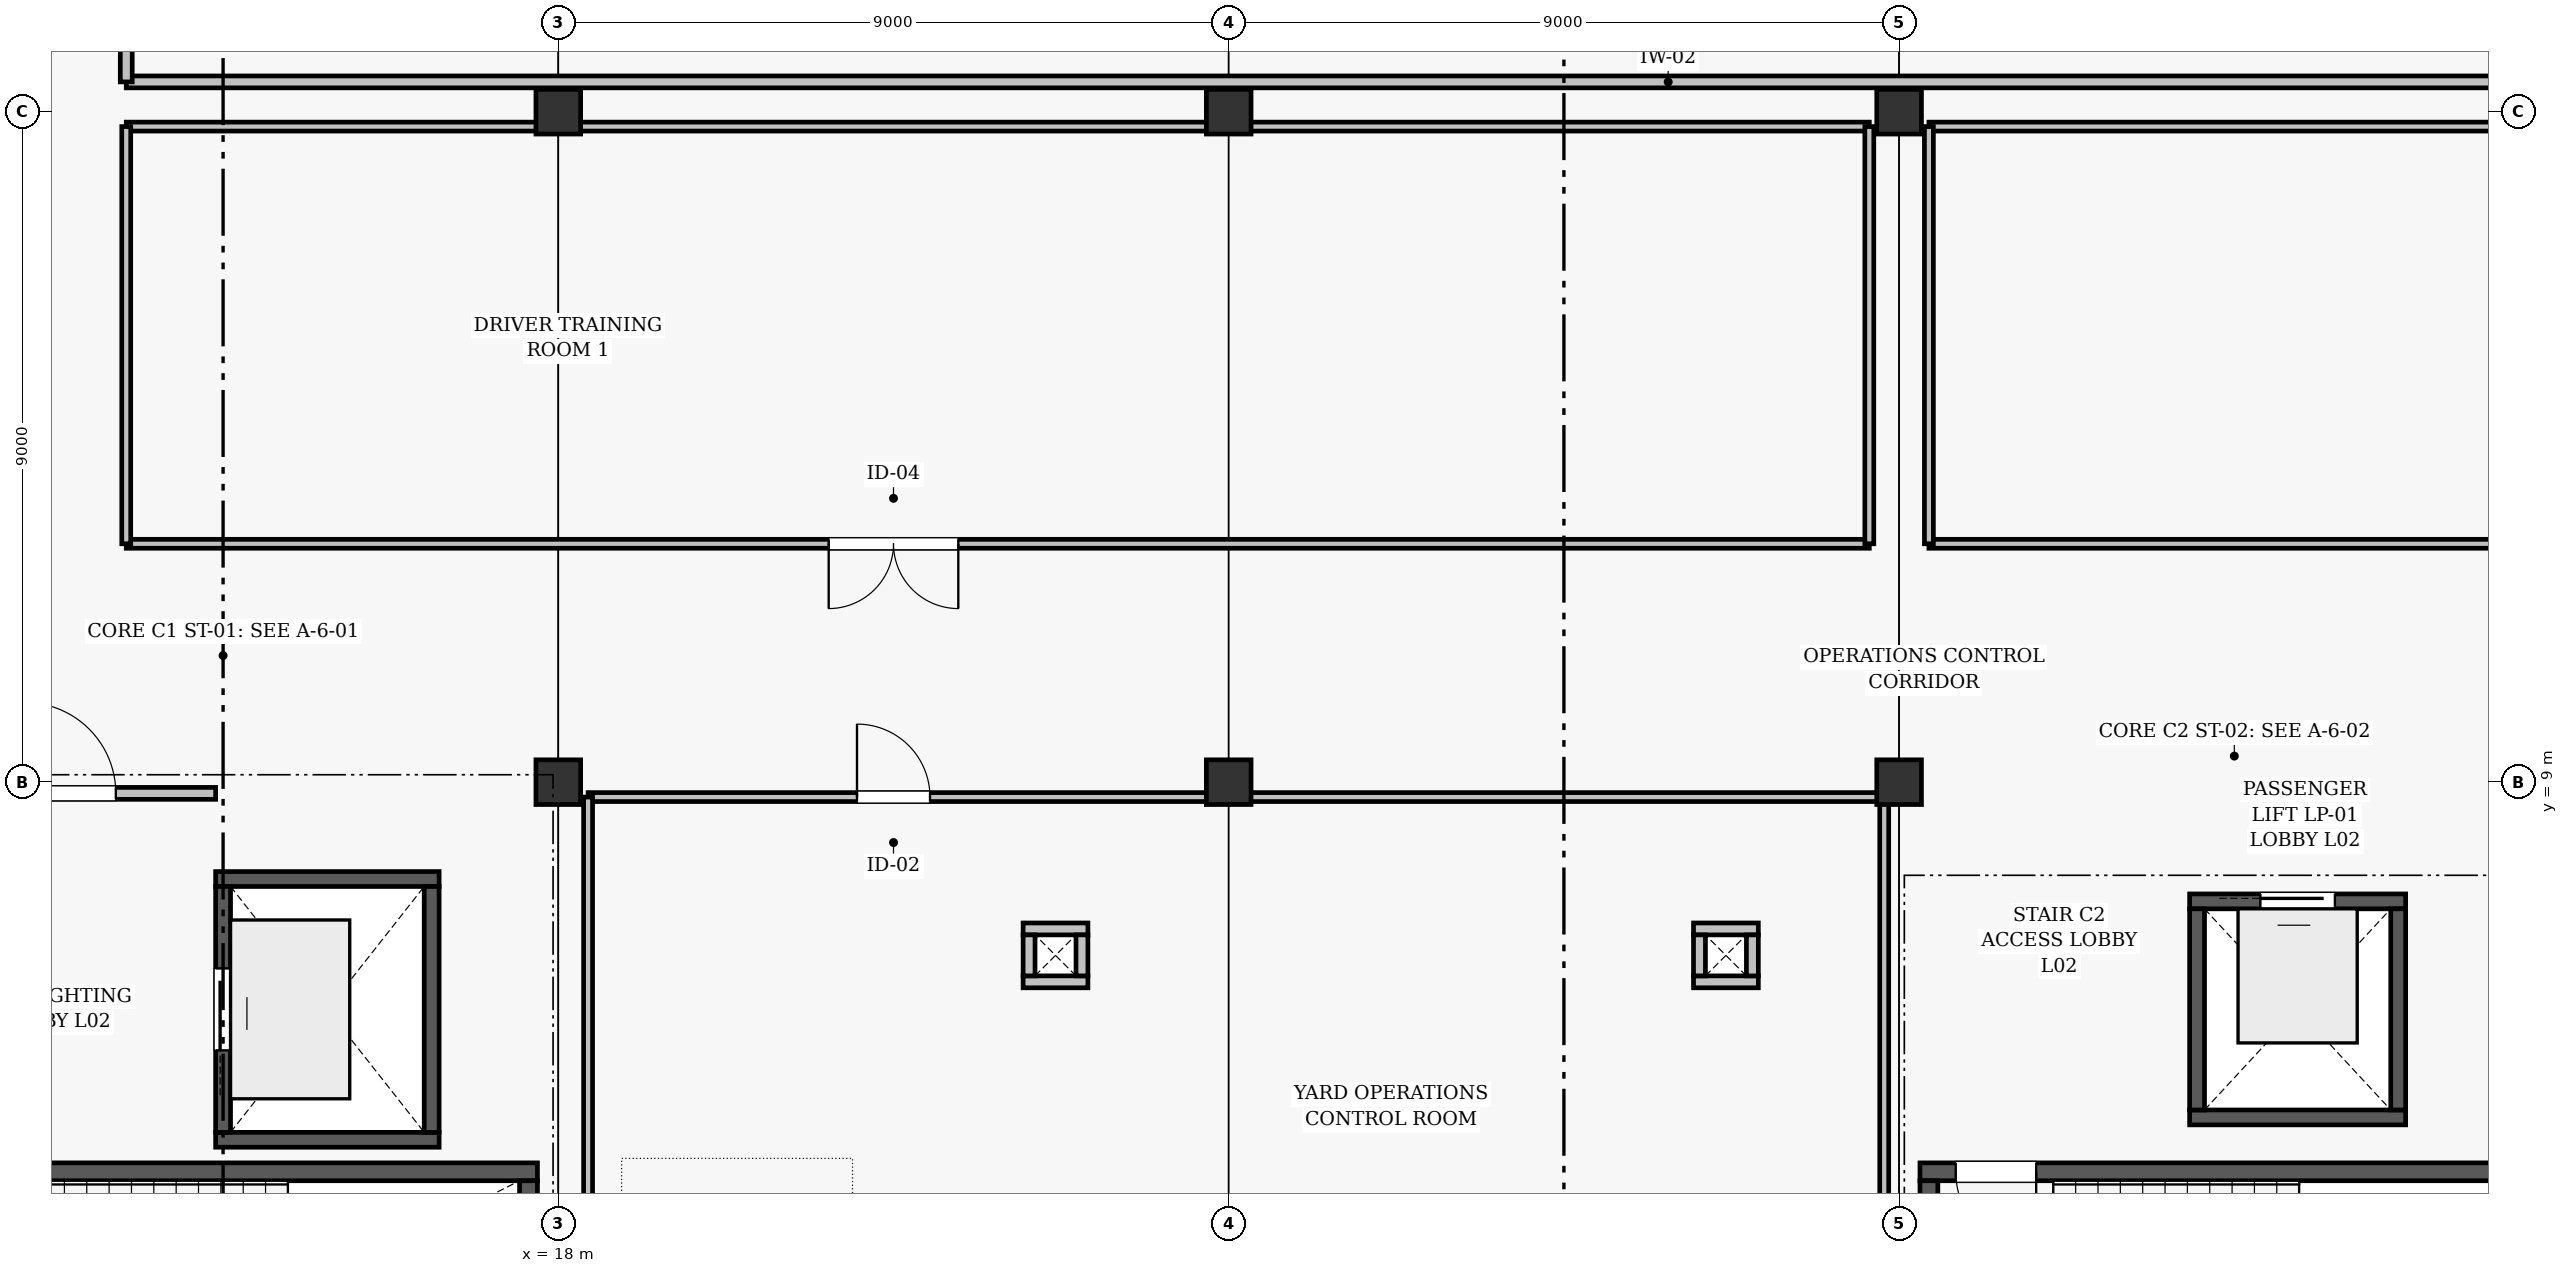
"""IFC4 building model, lengths in metres.
Left out: names, types, materials, properties, quantities, classifications, styles, units other than length and angle.
Written with IfcOpenShell. Run it as: python <this file> out.ifc"""

import sys

from ifc_helpers import new_model, si_unit, direction, frame, frame_2d, origin, origin_2d, place, context, subcontext, project, spatial, rectangle, extrude, element, fill, save


model = new_model("IFC4")
c1 = context("Model", 3, precision=1e-05, world=origin(), true_north=direction((0.0, 1.0)))
c2 = subcontext(c1, "Body", "Model", "MODEL_VIEW")
j1 = project(units=[si_unit("LENGTHUNIT", "METRE"), si_unit("PLANEANGLEUNIT", "RADIAN")], contexts=[c1])
p1 = place(None, origin())
s1 = spatial("IfcSite", under=j1, at=p1, CompositionType="ELEMENT")
p2 = place(p1, origin())
s2 = spatial("IfcBuilding", under=s1, at=p2, CompositionType="ELEMENT")
p3 = place(p2, frame((0.0, 0.0, 8.4)))
s3 = spatial("IfcBuildingStorey", under=s2, at=p3, CompositionType="ELEMENT", Elevation=8.4)
for number, where, z_axis, x_axis in (
    (1, (18.0, 9.0, 0.0), (0.0, 0.0, 1.0), (1.0, 0.0, 0.0)),
    (2, (18.0, 18.0, 0.0), (0.0, 0.0, 1.0), (1.0, 0.0, 0.0)),
    (3, (27.0, 9.0, 0.0), (0.0, 0.0, 1.0), (1.0, 0.0, 0.0)),
    (4, (27.0, 18.0, 0.0), (0.0, 0.0, 1.0), (1.0, 0.0, 0.0)),
    (5, (36.0, 9.0, 0.0), (0.0, 0.0, 1.0), (1.0, 0.0, 0.0)),
    (6, (36.0, 18.0, 0.0), (0.0, 0.0, 1.0), (1.0, 0.0, 0.0)),
):
    element("IfcColumn", number, at=place(p3, frame(where, z_axis=z_axis, x_axis=x_axis)), inside=s3, PredefinedType="COLUMN", context=c2, shape_type="SweptSolid", body=[
        extrude(rectangle(XDim=0.6, YDim=0.6, at=origin_2d()), origin(), (0.0, 0.0, 1.0), 3.6),
    ])
p4 = place(p3, frame((9.28, 3.77, 0.0), z_axis=(0.0, 0.0, 1.0), x_axis=(1.0, 0.0, 0.0)))
e7 = element("IfcWall", 7, at=p4, inside=s3, PredefinedType="SHEAR", context=c2, shape_type="SweptSolid", body=[
    extrude(rectangle(XDim=8.44, YDim=0.24, at=frame_2d((4.22, 0.0))), origin(), (0.0, 0.0, 1.0), 3.35),
])
p5 = place(p4, frame((0.48, 0.0, 0.0)))
e8 = element("IfcOpeningElement", 8, at=p5, cuts=e7, PredefinedType="OPENING", context=c2, shape_type="SweptSolid", body=[
    extrude(rectangle(XDim=1.08, YDim=2.08, at=frame_2d((0.54, 1.04))), frame((0.0, 0.13, 0.0), z_axis=(0.0, -1.0, 0.0), x_axis=(1.0, 0.0, 0.0)), (0.0, 0.0, 1.0), 0.26),
])
p6 = place(p3, frame((17.6, 0.4, 0.0), z_axis=(0.0, 0.0, 1.0), x_axis=(0.0, 1.0, 0.0)))
e9 = element("IfcWall", 9, at=p6, inside=s3, PredefinedType="SHEAR", context=c2, shape_type="SweptSolid", body=[
    extrude(rectangle(XDim=3.25, YDim=0.24, at=frame_2d((1.625, 0.0))), origin(), (0.0, 0.0, 1.0), 3.35),
])
p7 = place(p3, frame((36.28, 3.77, 0.0), z_axis=(0.0, 0.0, 1.0), x_axis=(1.0, 0.0, 0.0)))
e10 = element("IfcWall", 10, at=p7, inside=s3, PredefinedType="SHEAR", context=c2, shape_type="SweptSolid", body=[
    extrude(rectangle(XDim=8.44, YDim=0.24, at=frame_2d((4.22, 0.0))), origin(), (0.0, 0.0, 1.0), 3.35),
])
p8 = place(p7, frame((0.48, 0.0, 0.0)))
e11 = element("IfcOpeningElement", 11, at=p8, cuts=e10, PredefinedType="OPENING", context=c2, shape_type="SweptSolid", body=[
    extrude(rectangle(XDim=1.08, YDim=2.08, at=frame_2d((0.54, 1.04))), frame((0.0, 0.13, 0.0), z_axis=(0.0, -1.0, 0.0), x_axis=(1.0, 0.0, 0.0)), (0.0, 0.0, 1.0), 0.26),
])
p9 = place(p3, frame((36.4, 0.4, 0.0), z_axis=(0.0, 0.0, 1.0), x_axis=(0.0, 1.0, 0.0)))
e12 = element("IfcWall", 12, at=p9, inside=s3, PredefinedType="SHEAR", context=c2, shape_type="SweptSolid", body=[
    extrude(rectangle(XDim=3.25, YDim=0.24, at=frame_2d((1.625, 0.0))), origin(), (0.0, 0.0, 1.0), 3.35),
])
for number, where, z_axis, x_axis in (
    (13, (13.4, 4.2, 0.0), (0.0, 0.0, 1.0), (1.0, 0.0, 0.0)),
    (14, (13.4, 7.7, 0.0), (0.0, 0.0, 1.0), (1.0, 0.0, 0.0)),
):
    element("IfcWall", number, at=place(p3, frame(where, z_axis=z_axis, x_axis=x_axis)), inside=s3, PredefinedType="SHEAR", context=c2, shape_type="SweptSolid", body=[
        extrude(rectangle(XDim=3.0, YDim=0.2, at=frame_2d((1.5, 0.0))), origin(), (0.0, 0.0, 1.0), 3.35),
    ])
p10 = place(p3, frame((13.5, 4.3, 0.0), z_axis=(0.0, 0.0, 1.0), x_axis=(0.0, 1.0, 0.0)))
e15 = element("IfcWall", 15, at=p10, inside=s3, PredefinedType="SHEAR", context=c2, shape_type="SweptSolid", body=[
    extrude(rectangle(XDim=3.3, YDim=0.2, at=frame_2d((1.65, 0.0))), origin(), (0.0, 0.0, 1.0), 3.35),
])
p11 = place(p10, frame((1.1, 0.0, 0.0)))
e16 = element("IfcOpeningElement", 16, at=p11, cuts=e15, PredefinedType="OPENING", context=c2, shape_type="SweptSolid", body=[
    extrude(rectangle(XDim=1.1, YDim=2.1, at=frame_2d((0.55, 1.05))), frame((0.0, 0.11, 0.0), z_axis=(0.0, -1.0, 0.0), x_axis=(1.0, 0.0, 0.0)), (0.0, 0.0, 1.0), 0.22),
])
p12 = place(p3, frame((16.3, 4.3, 0.0), z_axis=(0.0, 0.0, 1.0), x_axis=(0.0, 1.0, 0.0)))
e17 = element("IfcWall", 17, at=p12, inside=s3, PredefinedType="SHEAR", context=c2, shape_type="SweptSolid", body=[
    extrude(rectangle(XDim=3.3, YDim=0.2, at=frame_2d((1.65, 0.0))), origin(), (0.0, 0.0, 1.0), 3.35),
])
p13 = place(p3, frame((39.9, 4.5, 0.0), z_axis=(0.0, 0.0, 1.0), x_axis=(1.0, 0.0, 0.0)))
e18 = element("IfcWall", 18, at=p13, inside=s3, PredefinedType="SHEAR", context=c2, shape_type="SweptSolid", body=[
    extrude(rectangle(XDim=2.9, YDim=0.2, at=frame_2d((1.45, 0.0))), origin(), (0.0, 0.0, 1.0), 3.35),
])
p14 = place(p3, frame((39.9, 7.4, 0.0), z_axis=(0.0, 0.0, 1.0), x_axis=(1.0, 0.0, 0.0)))
e19 = element("IfcWall", 19, at=p14, inside=s3, PredefinedType="SHEAR", context=c2, shape_type="SweptSolid", body=[
    extrude(rectangle(XDim=2.9, YDim=0.2, at=frame_2d((1.45, 0.0))), origin(), (0.0, 0.0, 1.0), 3.35),
])
p15 = place(p14, frame((0.95, 0.0, 0.0)))
e20 = element("IfcOpeningElement", 20, at=p15, cuts=e19, PredefinedType="OPENING", context=c2, shape_type="SweptSolid", body=[
    extrude(rectangle(XDim=1.0, YDim=2.1, at=frame_2d((0.5, 1.05))), frame((0.0, 0.11, 0.0), z_axis=(0.0, -1.0, 0.0), x_axis=(1.0, 0.0, 0.0)), (0.0, 0.0, 1.0), 0.22),
])
for number, where, z_axis, x_axis in (
    (21, (40.0, 4.6, 0.0), (0.0, 0.0, 1.0), (0.0, 1.0, 0.0)),
    (22, (42.7, 4.6, 0.0), (0.0, 0.0, 1.0), (0.0, 1.0, 0.0)),
):
    element("IfcWall", number, at=place(p3, frame(where, z_axis=z_axis, x_axis=x_axis)), inside=s3, PredefinedType="SHEAR", context=c2, shape_type="SweptSolid", body=[
        extrude(rectangle(XDim=2.7, YDim=0.2, at=frame_2d((1.35, 0.0))), origin(), (0.0, 0.0, 1.0), 3.35),
    ])
for number, where, z_axis, x_axis in (
    (23, (24.24, 6.32, 0.0), (0.0, 0.0, 1.0), (1.0, 0.0, 0.0)),
    (24, (24.24, 7.03, 0.0), (0.0, 0.0, 1.0), (1.0, 0.0, 0.0)),
):
    element("IfcWall", number, at=place(p3, frame(where, z_axis=z_axis, x_axis=x_axis)), inside=s3, PredefinedType="PARTITIONING", context=c2, shape_type="SweptSolid", body=[
        extrude(rectangle(XDim=0.87, YDim=0.16, at=frame_2d((0.435, 0.0))), origin(), (0.0, 0.0, 1.0), 3.35),
    ])
for number, where, z_axis, x_axis in (
    (25, (24.32, 6.4, 0.0), (0.0, 0.0, 1.0), (0.0, 1.0, 0.0)),
    (26, (25.03, 6.4, 0.0), (0.0, 0.0, 1.0), (0.0, 1.0, 0.0)),
):
    element("IfcWall", number, at=place(p3, frame(where, z_axis=z_axis, x_axis=x_axis)), inside=s3, PredefinedType="PARTITIONING", context=c2, shape_type="SweptSolid", body=[
        extrude(rectangle(XDim=0.55, YDim=0.16, at=frame_2d((0.275, 0.0))), origin(), (0.0, 0.0, 1.0), 3.35),
    ])
for number, where, z_axis, x_axis in (
    (27, (33.24, 6.32, 0.0), (0.0, 0.0, 1.0), (1.0, 0.0, 0.0)),
    (28, (33.24, 7.03, 0.0), (0.0, 0.0, 1.0), (1.0, 0.0, 0.0)),
):
    element("IfcWall", number, at=place(p3, frame(where, z_axis=z_axis, x_axis=x_axis)), inside=s3, PredefinedType="PARTITIONING", context=c2, shape_type="SweptSolid", body=[
        extrude(rectangle(XDim=0.87, YDim=0.16, at=frame_2d((0.435, 0.0))), origin(), (0.0, 0.0, 1.0), 3.35),
    ])
for number, where, z_axis, x_axis in (
    (29, (33.32, 6.4, 0.0), (0.0, 0.0, 1.0), (0.0, 1.0, 0.0)),
    (30, (34.03, 6.4, 0.0), (0.0, 0.0, 1.0), (0.0, 1.0, 0.0)),
):
    element("IfcWall", number, at=place(p3, frame(where, z_axis=z_axis, x_axis=x_axis)), inside=s3, PredefinedType="PARTITIONING", context=c2, shape_type="SweptSolid", body=[
        extrude(rectangle(XDim=0.55, YDim=0.16, at=frame_2d((0.275, 0.0))), origin(), (0.0, 0.0, 1.0), 3.35),
    ])
p16 = place(p3, frame((9.52, 8.85, 0.0), z_axis=(0.0, 0.0, 1.0), x_axis=(1.0, 0.0, 0.0)))
e31 = element("IfcWall", 31, at=p16, inside=s3, PredefinedType="PARTITIONING", context=c2, shape_type="SweptSolid", body=[
    extrude(rectangle(XDim=3.88, YDim=0.16, at=frame_2d((1.94, 0.0))), origin(), (0.0, 0.0, 1.0), 2.845),
])
p17 = place(p16, frame((1.32, 0.0, 0.0)))
e32 = element("IfcOpeningElement", 32, at=p17, cuts=e31, PredefinedType="OPENING", context=c2, shape_type="SweptSolid", body=[
    extrude(rectangle(XDim=1.22, YDim=2.12, at=frame_2d((0.61, 1.06))), frame((0.0, 0.09, 0.0), z_axis=(0.0, -1.0, 0.0), x_axis=(1.0, 0.0, 0.0)), (0.0, 0.0, 1.0), 0.18),
])
p18 = place(p3, frame((18.4, 8.8, 0.0), z_axis=(0.0, 0.0, 1.0), x_axis=(1.0, 0.0, 0.0)))
e33 = element("IfcWall", 33, at=p18, inside=s3, PredefinedType="PARTITIONING", context=c2, shape_type="SweptSolid", body=[
    extrude(rectangle(XDim=17.4, YDim=0.12, at=frame_2d((8.7, 0.0))), origin(), (0.0, 0.0, 1.0), 2.845),
])
p19 = place(p18, frame((3.61, 0.0, 0.0)))
e34 = element("IfcOpeningElement", 34, at=p19, cuts=e33, PredefinedType="OPENING", context=c2, shape_type="SweptSolid", body=[
    extrude(rectangle(XDim=0.98, YDim=2.08, at=frame_2d((0.49, 1.04))), frame((0.0, 0.07, 0.0), z_axis=(0.0, -1.0, 0.0), x_axis=(1.0, 0.0, 0.0)), (0.0, 0.0, 1.0), 0.14),
])
for number, where, z_axis, x_axis in (
    (35, (18.4, 0.4, 0.0), (0.0, 0.0, 1.0), (0.0, 1.0, 0.0)),
    (36, (35.8, 0.4, 0.0), (0.0, 0.0, 1.0), (0.0, 1.0, 0.0)),
):
    element("IfcWall", number, at=place(p3, frame(where, z_axis=z_axis, x_axis=x_axis)), inside=s3, PredefinedType="PARTITIONING", context=c2, shape_type="SweptSolid", body=[
        extrude(rectangle(XDim=8.4, YDim=0.12, at=frame_2d((4.2, 0.0))), origin(), (0.0, 0.0, 1.0), 2.845),
    ])
p20 = place(p3, frame((12.2, 12.2, 0.0), z_axis=(0.0, 0.0, 1.0), x_axis=(1.0, 0.0, 0.0)))
e37 = element("IfcWall", 37, at=p20, inside=s3, PredefinedType="PARTITIONING", context=c2, shape_type="SweptSolid", body=[
    extrude(rectangle(XDim=23.4, YDim=0.12, at=frame_2d((11.7, 0.0))), origin(), (0.0, 0.0, 1.0), 2.895),
])
p21 = place(p20, frame((9.43, 0.0, 0.0)))
e38 = element("IfcOpeningElement", 38, at=p21, cuts=e37, PredefinedType="OPENING", context=c2, shape_type="SweptSolid", body=[
    extrude(rectangle(XDim=1.74, YDim=2.18, at=frame_2d((0.87, 1.09))), frame((0.0, 0.07, 0.0), z_axis=(0.0, -1.0, 0.0), x_axis=(1.0, 0.0, 0.0)), (0.0, 0.0, 1.0), 0.14),
])
p22 = place(p3, frame((12.2, 17.8, 0.0), z_axis=(0.0, 0.0, 1.0), x_axis=(1.0, 0.0, 0.0)))
e39 = element("IfcWall", 39, at=p22, inside=s3, PredefinedType="PARTITIONING", context=c2, shape_type="SweptSolid", body=[
    extrude(rectangle(XDim=23.4, YDim=0.12, at=frame_2d((11.7, 0.0))), origin(), (0.0, 0.0, 1.0), 2.845),
])
for number, where, z_axis, x_axis in (
    (40, (12.2, 12.2, 0.0), (0.0, 0.0, 1.0), (0.0, 1.0, 0.0)),
    (41, (35.6, 12.2, 0.0), (0.0, 0.0, 1.0), (0.0, 1.0, 0.0)),
):
    element("IfcWall", number, at=place(p3, frame(where, z_axis=z_axis, x_axis=x_axis)), inside=s3, PredefinedType="PARTITIONING", context=c2, shape_type="SweptSolid", body=[
        extrude(rectangle(XDim=5.6, YDim=0.12, at=frame_2d((2.8, 0.0))), origin(), (0.0, 0.0, 1.0), 2.845),
    ])
p23 = place(p3, frame((36.4, 12.2, 0.0), z_axis=(0.0, 0.0, 1.0), x_axis=(1.0, 0.0, 0.0)))
e42 = element("IfcWall", 42, at=p23, inside=s3, PredefinedType="PARTITIONING", context=c2, shape_type="SweptSolid", body=[
    extrude(rectangle(XDim=26.2, YDim=0.12, at=frame_2d((13.1, 0.0))), origin(), (0.0, 0.0, 1.0), 2.895),
])
p24 = place(p23, frame((12.29, 0.0, 0.0)))
e43 = element("IfcOpeningElement", 43, at=p24, cuts=e42, PredefinedType="OPENING", context=c2, shape_type="SweptSolid", body=[
    extrude(rectangle(XDim=1.62, YDim=2.14, at=frame_2d((0.81, 1.07))), frame((0.0, 0.07, 0.0), z_axis=(0.0, -1.0, 0.0), x_axis=(1.0, 0.0, 0.0)), (0.0, 0.0, 1.0), 0.14),
])
p25 = place(p3, frame((36.4, 17.8, 0.0), z_axis=(0.0, 0.0, 1.0), x_axis=(1.0, 0.0, 0.0)))
e44 = element("IfcWall", 44, at=p25, inside=s3, PredefinedType="PARTITIONING", context=c2, shape_type="SweptSolid", body=[
    extrude(rectangle(XDim=26.2, YDim=0.12, at=frame_2d((13.1, 0.0))), origin(), (0.0, 0.0, 1.0), 2.845),
])
p26 = place(p3, frame((36.4, 12.2, 0.0), z_axis=(0.0, 0.0, 1.0), x_axis=(0.0, 1.0, 0.0)))
e45 = element("IfcWall", 45, at=p26, inside=s3, PredefinedType="PARTITIONING", context=c2, shape_type="SweptSolid", body=[
    extrude(rectangle(XDim=5.6, YDim=0.12, at=frame_2d((2.8, 0.0))), origin(), (0.0, 0.0, 1.0), 2.845),
])
p27 = place(p3, frame((12.2, 18.4, 0.0), z_axis=(0.0, 0.0, 1.0), x_axis=(1.0, 0.0, 0.0)))
e46 = element("IfcWall", 46, at=p27, inside=s3, PredefinedType="PARTITIONING", context=c2, shape_type="SweptSolid", body=[
    extrude(rectangle(XDim=41.4, YDim=0.16, at=frame_2d((20.7, 0.0))), origin(), (0.0, 0.0, 1.0), 2.895),
])
p28 = place(p3, frame((12.2, 18.4, 0.0), z_axis=(0.0, 0.0, 1.0), x_axis=(0.0, 1.0, 0.0)))
e47 = element("IfcWall", 47, at=p28, inside=s3, PredefinedType="PARTITIONING", context=c2, shape_type="SweptSolid", body=[
    extrude(rectangle(XDim=8.2, YDim=0.16, at=frame_2d((4.1, 0.0))), origin(), (0.0, 0.0, 1.0), 3.35),
])
p29 = place(p28, frame((3.59, 0.0, 0.0)))
e48 = element("IfcOpeningElement", 48, at=p29, cuts=e47, PredefinedType="OPENING", context=c2, shape_type="SweptSolid", body=[
    extrude(rectangle(XDim=1.02, YDim=2.1, at=frame_2d((0.51, 1.05))), frame((0.0, 0.09, 0.0), z_axis=(0.0, -1.0, 0.0), x_axis=(1.0, 0.0, 0.0)), (0.0, 0.0, 1.0), 0.18),
])
p30 = place(p8, frame((1.08, 0.0, 0.0), z_axis=(0.0, 0.0, 1.0), x_axis=(-1.0, 0.0, 0.0)))
e49 = element("IfcDoor", 49, at=p30, inside=s3, OperationType="SINGLE_SWING_RIGHT", PredefinedType="DOOR", context=c2, shape_type="SweptSolid", body=[
    extrude(rectangle(XDim=1.08, YDim=2.08, at=frame_2d((0.54, 1.04))), frame((0.0, 0.025, 0.0), z_axis=(0.0, -1.0, 0.0), x_axis=(1.0, 0.0, 0.0)), (0.0, 0.0, 1.0), 0.05),
])
fill(e11, e49)
p31 = place(p11, origin())
e50 = element("IfcDoor", 50, at=p31, inside=s3, OperationType="SLIDING_TO_LEFT", PredefinedType="DOOR", context=c2, shape_type="SweptSolid", body=[
    extrude(rectangle(XDim=1.1, YDim=2.1, at=frame_2d((0.55, 1.05))), frame((0.0, 0.025, 0.0), z_axis=(0.0, -1.0, 0.0), x_axis=(1.0, 0.0, 0.0)), (0.0, 0.0, 1.0), 0.05),
])
fill(e16, e50)
p32 = place(p15, origin())
e51 = element("IfcDoor", 51, at=p32, inside=s3, OperationType="SLIDING_TO_LEFT", PredefinedType="DOOR", context=c2, shape_type="SweptSolid", body=[
    extrude(rectangle(XDim=1.0, YDim=2.1, at=frame_2d((0.5, 1.05))), frame((0.0, 0.025, 0.0), z_axis=(0.0, -1.0, 0.0), x_axis=(1.0, 0.0, 0.0)), (0.0, 0.0, 1.0), 0.05),
])
fill(e20, e51)
p33 = place(p17, origin())
e52 = element("IfcDoor", 52, at=p33, inside=s3, OperationType="SINGLE_SWING_LEFT", PredefinedType="DOOR", context=c2, shape_type="SweptSolid", body=[
    extrude(rectangle(XDim=1.22, YDim=2.12, at=frame_2d((0.61, 1.06))), frame((0.0, 0.025, 0.0), z_axis=(0.0, -1.0, 0.0), x_axis=(1.0, 0.0, 0.0)), (0.0, 0.0, 1.0), 0.05),
])
fill(e32, e52)
p34 = place(p19, origin())
e53 = element("IfcDoor", 53, at=p34, inside=s3, OperationType="SINGLE_SWING_LEFT", PredefinedType="DOOR", context=c2, shape_type="SweptSolid", body=[
    extrude(rectangle(XDim=0.98, YDim=2.08, at=frame_2d((0.49, 1.04))), frame((0.0, 0.025, 0.0), z_axis=(0.0, -1.0, 0.0), x_axis=(1.0, 0.0, 0.0)), (0.0, 0.0, 1.0), 0.05),
])
fill(e34, e53)
p35 = place(p21, frame((1.74, 0.0, 0.0), z_axis=(0.0, 0.0, 1.0), x_axis=(-1.0, 0.0, 0.0)))
e54 = element("IfcDoor", 54, at=p35, inside=s3, OperationType="DOUBLE_SWING_LEFT", PredefinedType="DOOR", context=c2, shape_type="SweptSolid", body=[
    extrude(rectangle(XDim=1.74, YDim=2.18, at=frame_2d((0.87, 1.09))), frame((0.0, 0.025, 0.0), z_axis=(0.0, -1.0, 0.0), x_axis=(1.0, 0.0, 0.0)), (0.0, 0.0, 1.0), 0.05),
])
fill(e38, e54)
save(model, sys.argv[1])
